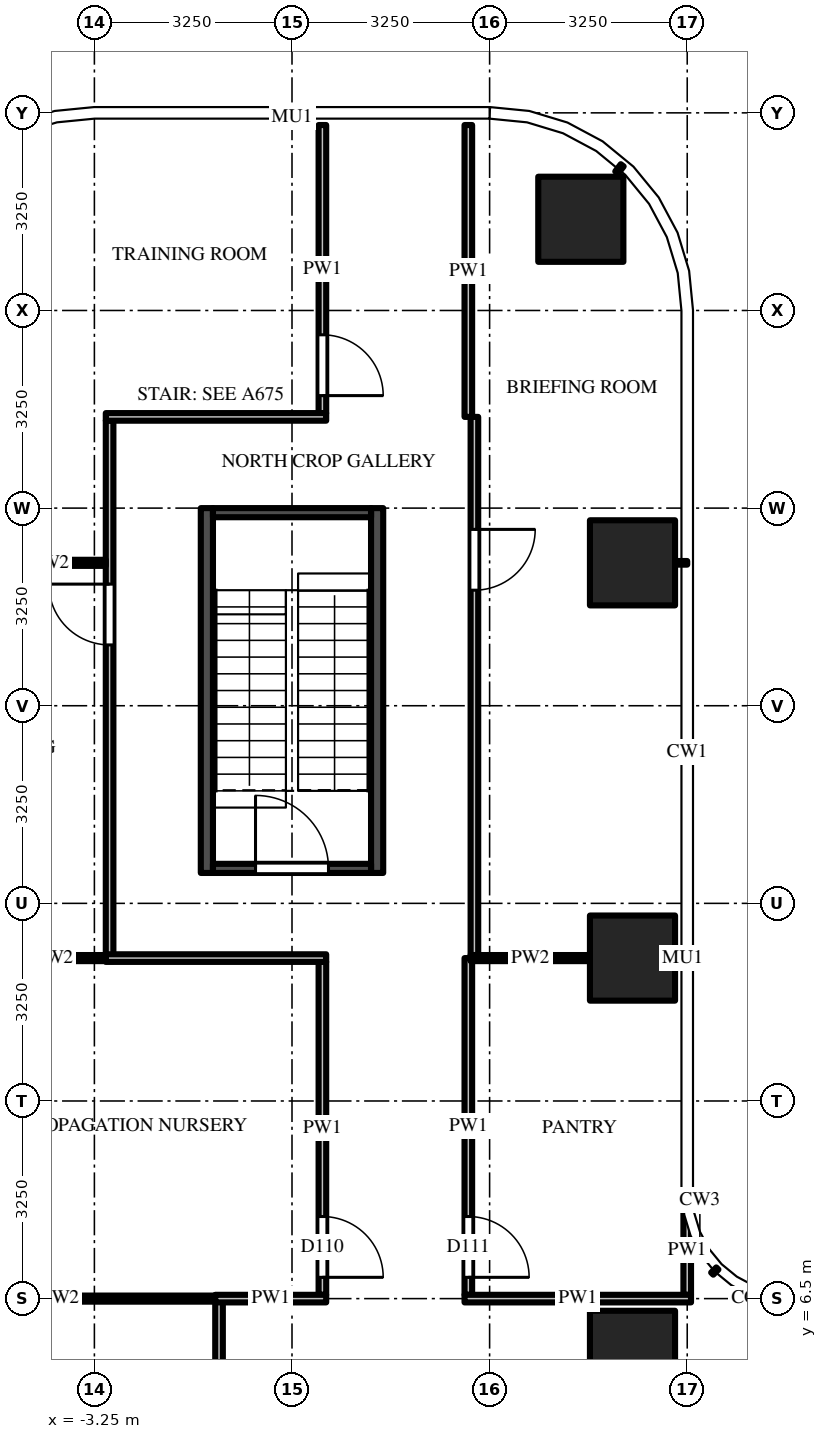
"""IFC4 building model, lengths in metres.
Left out: names, types, materials, properties, quantities, classifications, styles, units other than length and angle.
Written with IfcOpenShell. Run it as: python <this file> out.ifc"""

import sys

from ifc_helpers import new_model, si_unit, direction, frame, frame_2d, origin, origin_2d, place, context, subcontext, project, spatial, rectangle, extrude, source, transform, mapped, element, fill, save


model = new_model("IFC4")
c1 = context("Model", 3, precision=1e-05, world=origin(), true_north=direction((0.0, 1.0)))
c2 = subcontext(c1, "Body", "Model", "MODEL_VIEW")
j1 = project(units=[si_unit("LENGTHUNIT", "METRE"), si_unit("PLANEANGLEUNIT", "RADIAN")], contexts=[c1])
p1 = place(None, origin())
s1 = spatial("IfcSite", under=j1, at=p1, CompositionType="ELEMENT")
p2 = place(p1, origin())
s2 = spatial("IfcBuilding", under=s1, at=p2, CompositionType="ELEMENT")
p3 = place(p2, frame((0.0, 0.0, 88.0)))
s3 = spatial("IfcBuildingStorey", under=s2, at=p3, CompositionType="ELEMENT", Elevation=88.0)
m1 = source(origin(), c2, "Body", "SweptSolid", [
    extrude(rectangle(XDim=1.4, YDim=1.4, at=origin_2d()), origin(), (0.0, 0.0, 1.0), 4.5),
])
for number, where, z_axis, x_axis in (
    (1, (5.6, 12.1, 0.0), (0.0, 0.0, 1.0), (1.0, 0.0, 0.0)),
    (2, (5.6, 18.6, 0.0), (0.0, 0.0, 1.0), (1.0, 0.0, 0.0)),
    (3, (4.75, 24.25, 0.0), (0.0, 0.0, 1.0), (1.0, 0.0, 0.0)),
    (4, (5.6, 5.6, 0.0), (0.0, 0.0, 1.0), (1.0, 0.0, 0.0)),
):
    element("IfcColumn", number, at=place(p3, frame(where, z_axis=z_axis, x_axis=x_axis)), inside=s3, PredefinedType="COLUMN", context=c2, shape_type="MappedRepresentation", body=[
        mapped(m1, transform((0.0, 0.0, 0.0))),
    ])
m2 = source(origin(), c2, "Body", "SweptSolid", [
    extrude(rectangle(XDim=6.0, YDim=0.2, at=frame_2d((3.0, 0.0))), origin(), (0.0, 0.0, 1.0), 4.2),
])
for number, where, z_axis, x_axis in (
    (5, (-1.4, 13.5, 0.0), (0.0, 0.0, 1.0), (0.0, 1.0, 0.0)),
    (6, (1.4, 13.5, 0.0), (0.0, 0.0, 1.0), (0.0, 1.0, 0.0)),
):
    element("IfcWall", number, at=place(p3, frame(where, z_axis=z_axis, x_axis=x_axis)), inside=s3, PredefinedType="SHEAR", context=c2, shape_type="MappedRepresentation", body=[
        mapped(m2, transform((0.0, 0.0, 0.0))),
    ])
m3 = source(origin(), c2, "Body", "SweptSolid", [
    extrude(rectangle(XDim=2.6, YDim=0.15, at=frame_2d((1.3, 0.0))), origin(), (0.0, 0.0, 1.0), 4.2),
])
p4 = place(p3, frame((-1.3, 13.575, 0.0), z_axis=(0.0, 0.0, 1.0), x_axis=(1.0, 0.0, 0.0)))
e7 = element("IfcWall", 7, at=p4, inside=s3, PredefinedType="SHEAR", context=c2, shape_type="MappedRepresentation", body=[
    mapped(m3, transform((0.0, 0.0, 0.0))),
])
m4 = source(origin(), c2, "Body", "SweptSolid", [
    extrude(rectangle(XDim=1.2, YDim=2.1, at=frame_2d((0.6, 1.05))), frame((0.0, 0.085, 0.0), z_axis=(0.0, -1.0, 0.0), x_axis=(1.0, 0.0, 0.0)), (0.0, 0.0, 1.0), 0.17),
])
p5 = place(p4, frame((0.7, 0.0, 0.0)))
e8 = element("IfcOpeningElement", 8, at=p5, cuts=e7, PredefinedType="OPENING", context=c2, shape_type="MappedRepresentation", body=[
    mapped(m4, transform((0.0, 0.0, 0.0))),
])
p6 = place(p3, frame((-1.3, 19.425, 0.0), z_axis=(0.0, 0.0, 1.0), x_axis=(1.0, 0.0, 0.0)))
e9 = element("IfcWall", 9, at=p6, inside=s3, PredefinedType="SHEAR", context=c2, shape_type="MappedRepresentation", body=[
    mapped(m3, transform((0.0, 0.0, 0.0))),
])
p7 = place(p3, frame((-3.0, 12.15, 0.0), z_axis=(0.0, 0.0, 1.0), x_axis=(0.0, 1.0, 0.0)))
e10 = element("IfcWall", 10, at=p7, inside=s3, PredefinedType="PARTITIONING", context=c2, shape_type="SweptSolid", body=[
    extrude(rectangle(XDim=8.788, YDim=0.125, at=frame_2d((4.394, 0.0))), origin(), (0.0, 0.0, 1.0), 3.418),
])
m5 = source(origin(), c2, "Body", "SweptSolid", [
    extrude(rectangle(XDim=1.0, YDim=2.1, at=frame_2d((0.5, 1.05))), frame((0.0, 0.073, 0.0), z_axis=(0.0, -1.0, 0.0), x_axis=(1.0, 0.0, 0.0)), (0.0, 0.0, 1.0), 0.145),
])
p8 = place(p7, frame((5.1, 0.0, 0.0)))
e11 = element("IfcOpeningElement", 11, at=p8, cuts=e10, PredefinedType="OPENING", context=c2, shape_type="MappedRepresentation", body=[
    mapped(m5, transform((0.0, 0.0, 0.0))),
])
m6 = source(origin(), c2, "Body", "SweptSolid", [
    extrude(rectangle(XDim=3.137, YDim=0.125, at=frame_2d((1.569, 0.0))), origin(), (0.0, 0.0, 1.0), 3.418),
])
p9 = place(p3, frame((-1.2, 6.45, 0.0), z_axis=(0.0, 0.0, 1.0), x_axis=(0.0, -1.0, 0.0)))
e12 = element("IfcWall", 12, at=p9, inside=s3, PredefinedType="PARTITIONING", context=c2, shape_type="MappedRepresentation", body=[
    mapped(m6, transform((0.0, 0.0, 0.0))),
])
m7 = source(origin(), c2, "Body", "SweptSolid", [
    extrude(rectangle(XDim=5.475, YDim=0.125, at=frame_2d((2.738, 0.0))), origin(), (0.0, 0.0, 1.0), 3.418),
])
p10 = place(p3, frame((0.5, 12.038, 0.0), z_axis=(0.0, 0.0, 1.0), x_axis=(0.0, -1.0, 0.0)))
e13 = element("IfcWall", 13, at=p10, inside=s3, PredefinedType="PARTITIONING", context=c2, shape_type="MappedRepresentation", body=[
    mapped(m7, transform((0.0, 0.0, 0.0))),
])
p11 = place(p10, frame((4.188, 0.0, 0.0)))
e14 = element("IfcOpeningElement", 14, at=p11, cuts=e13, PredefinedType="OPENING", context=c2, shape_type="MappedRepresentation", body=[
    mapped(m5, transform((0.0, 0.0, 0.0))),
])
p12 = place(p3, frame((0.5, 25.8, 0.0), z_axis=(0.0, 0.0, 1.0), x_axis=(0.0, -1.0, 0.0)))
e15 = element("IfcWall", 15, at=p12, inside=s3, PredefinedType="PARTITIONING", context=c2, shape_type="SweptSolid", body=[
    extrude(rectangle(XDim=4.738, YDim=0.125, at=frame_2d((2.369, 0.0))), origin(), (0.0, 0.0, 1.0), 3.28),
])
p13 = place(p12, frame((3.45, 0.0, 0.0)))
e16 = element("IfcOpeningElement", 16, at=p13, cuts=e15, PredefinedType="OPENING", context=c2, shape_type="MappedRepresentation", body=[
    mapped(m5, transform((0.0, 0.0, 0.0))),
])
m8 = source(origin(), c2, "Body", "SweptSolid", [
    extrude(rectangle(XDim=5.538, YDim=0.125, at=frame_2d((2.769, 0.0))), origin(), (0.0, 0.0, 1.0), 3.418),
])
p14 = place(p3, frame((2.9, 12.1, 0.0), z_axis=(0.0, 0.0, 1.0), x_axis=(0.0, -1.0, 0.0)))
e17 = element("IfcWall", 17, at=p14, inside=s3, PredefinedType="PARTITIONING", context=c2, shape_type="MappedRepresentation", body=[
    mapped(m8, transform((0.0, 0.0, 0.0))),
])
p15 = place(p14, frame((4.25, 0.0, 0.0)))
e18 = element("IfcOpeningElement", 18, at=p15, cuts=e17, PredefinedType="OPENING", context=c2, shape_type="MappedRepresentation", body=[
    mapped(m5, transform((0.0, 0.0, 0.0))),
])
p16 = place(p3, frame((2.9, 25.8, 0.0), z_axis=(0.0, 0.0, 1.0), x_axis=(0.0, -1.0, 0.0)))
e19 = element("IfcWall", 19, at=p16, inside=s3, PredefinedType="PARTITIONING", context=c2, shape_type="SweptSolid", body=[
    extrude(rectangle(XDim=4.8, YDim=0.125, at=frame_2d((2.4, 0.0))), origin(), (0.0, 0.0, 1.0), 3.28),
])
p17 = place(p3, frame((3.0, 21.0, 0.0), z_axis=(0.0, 0.0, 1.0), x_axis=(0.0, -1.0, 0.0)))
e20 = element("IfcWall", 20, at=p17, inside=s3, PredefinedType="PARTITIONING", context=c2, shape_type="SweptSolid", body=[
    extrude(rectangle(XDim=8.85, YDim=0.125, at=frame_2d((4.425, 0.0))), origin(), (0.0, 0.0, 1.0), 3.418),
])
p18 = place(p17, frame((1.85, 0.0, 0.0)))
e21 = element("IfcOpeningElement", 21, at=p18, cuts=e20, PredefinedType="OPENING", context=c2, shape_type="MappedRepresentation", body=[
    mapped(m5, transform((0.0, 0.0, 0.0))),
])
m9 = source(origin(), c2, "Body", "SweptSolid", [
    extrude(rectangle(XDim=1.469, YDim=0.125, at=frame_2d((0.734, 0.0))), origin(), (0.0, 0.0, 1.0), 4.2),
])
p19 = place(p3, frame((6.5, 6.562, 0.0), z_axis=(0.0, 0.0, 1.0), x_axis=(0.0, 1.0, 0.0)))
e22 = element("IfcWall", 22, at=p19, inside=s3, PredefinedType="PARTITIONING", context=c2, shape_type="MappedRepresentation", body=[
    mapped(m9, transform((0.0, 0.0, 0.0))),
])
m10 = source(origin(), c2, "Body", "SweptSolid", [
    extrude(rectangle(XDim=5.363, YDim=0.1, at=frame_2d((2.681, 0.0))), origin(), (0.0, 0.0, 1.0), 3.28),
])
p20 = place(p3, frame((-6.5, 6.5, 0.0), z_axis=(0.0, 0.0, 1.0), x_axis=(1.0, 0.0, 0.0)))
e23 = element("IfcWall", 23, at=p20, inside=s3, PredefinedType="PARTITIONING", context=c2, shape_type="MappedRepresentation", body=[
    mapped(m10, transform((0.0, 0.0, 0.0))),
])
m11 = source(origin(), c2, "Body", "SweptSolid", [
    extrude(rectangle(XDim=1.825, YDim=0.125, at=frame_2d((0.913, 0.0))), origin(), (0.0, 0.0, 1.0), 4.2),
])
p21 = place(p3, frame((-1.262, 6.5, 0.0), z_axis=(0.0, 0.0, 1.0), x_axis=(1.0, 0.0, 0.0)))
e24 = element("IfcWall", 24, at=p21, inside=s3, PredefinedType="PARTITIONING", context=c2, shape_type="MappedRepresentation", body=[
    mapped(m11, transform((0.0, 0.0, 0.0))),
])
m12 = source(origin(), c2, "Body", "SweptSolid", [
    extrude(rectangle(XDim=3.725, YDim=0.125, at=frame_2d((1.863, 0.0))), origin(), (0.0, 0.0, 1.0), 3.28),
])
p22 = place(p3, frame((2.837, 6.5, 0.0), z_axis=(0.0, 0.0, 1.0), x_axis=(1.0, 0.0, 0.0)))
e25 = element("IfcWall", 25, at=p22, inside=s3, PredefinedType="PARTITIONING", context=c2, shape_type="MappedRepresentation", body=[
    mapped(m12, transform((0.0, 0.0, 0.0))),
])
m13 = source(origin(), c2, "Body", "SweptSolid", [
    extrude(rectangle(XDim=1.962, YDim=0.1, at=frame_2d((0.981, 0.0))), origin(), (0.0, 0.0, 1.0), 3.418),
])
for number, where, z_axis, x_axis in (
    (26, (-4.9, 12.1, 0.0), (0.0, 0.0, 1.0), (1.0, 0.0, 0.0)),
    (27, (2.938, 12.1, 0.0), (0.0, 0.0, 1.0), (1.0, 0.0, 0.0)),
):
    element("IfcWall", number, at=place(p3, frame(where, z_axis=z_axis, x_axis=x_axis)), inside=s3, PredefinedType="PARTITIONING", context=c2, shape_type="MappedRepresentation", body=[
        mapped(m13, transform((0.0, 0.0, 0.0))),
    ])
m14 = source(origin(), c2, "Body", "SweptSolid", [
    extrude(rectangle(XDim=3.625, YDim=0.125, at=frame_2d((1.812, 0.0))), origin(), (0.0, 0.0, 1.0), 3.418),
])
p23 = place(p3, frame((0.562, 12.1, 0.0), z_axis=(0.0, 0.0, 1.0), x_axis=(-1.0, 0.0, 0.0)))
e28 = element("IfcWall", 28, at=p23, inside=s3, PredefinedType="PARTITIONING", context=c2, shape_type="MappedRepresentation", body=[
    mapped(m14, transform((0.0, 0.0, 0.0))),
])
p24 = place(p3, frame((-4.9, 18.6, 0.0), z_axis=(0.0, 0.0, 1.0), x_axis=(1.0, 0.0, 0.0)))
e29 = element("IfcWall", 29, at=p24, inside=s3, PredefinedType="PARTITIONING", context=c2, shape_type="SweptSolid", body=[
    extrude(rectangle(XDim=1.837, YDim=0.1, at=frame_2d((0.919, 0.0))), origin(), (0.0, 0.0, 1.0), 3.647),
])
p25 = place(p3, frame((-3.062, 21.0, 0.0), z_axis=(0.0, 0.0, 1.0), x_axis=(1.0, 0.0, 0.0)))
e30 = element("IfcWall", 30, at=p25, inside=s3, PredefinedType="PARTITIONING", context=c2, shape_type="SweptSolid", body=[
    extrude(rectangle(XDim=3.625, YDim=0.125, at=frame_2d((1.812, 0.0))), origin(), (0.0, 0.0, 1.0), 4.2),
])
m15 = source(origin(), c2, "Body", "SweptSolid", [
    extrude(rectangle(XDim=1.2, YDim=2.1, at=frame_2d((0.6, 1.05))), frame((0.0, 0.025, 0.0), z_axis=(0.0, -1.0, 0.0), x_axis=(1.0, 0.0, 0.0)), (0.0, 0.0, 1.0), 0.05),
])
p26 = place(p5, origin())
e31 = element("IfcDoor", 31, at=p26, inside=s3, OperationType="SINGLE_SWING_LEFT", PredefinedType="DOOR", context=c2, shape_type="MappedRepresentation", body=[
    mapped(m15, transform((0.0, 0.0, 0.0))),
])
fill(e8, e31)
m16 = source(origin(), c2, "Body", "SweptSolid", [
    extrude(rectangle(XDim=1.0, YDim=2.1, at=frame_2d((0.5, 1.05))), frame((0.0, 0.025, 0.0), z_axis=(0.0, -1.0, 0.0), x_axis=(1.0, 0.0, 0.0)), (0.0, 0.0, 1.0), 0.05),
])
p27 = place(p11, origin())
e32 = element("IfcDoor", 32, at=p27, inside=s3, OperationType="SINGLE_SWING_RIGHT", PredefinedType="DOOR", context=c2, shape_type="MappedRepresentation", body=[
    mapped(m16, transform((0.0, 0.0, 0.0))),
])
fill(e14, e32)
p28 = place(p15, origin())
e33 = element("IfcDoor", 33, at=p28, inside=s3, OperationType="SINGLE_SWING_RIGHT", PredefinedType="DOOR", context=c2, shape_type="MappedRepresentation", body=[
    mapped(m16, transform((0.0, 0.0, 0.0))),
])
fill(e18, e33)
p29 = place(p8, origin())
e34 = element("IfcDoor", 34, at=p29, inside=s3, OperationType="SINGLE_SWING_RIGHT", PredefinedType="DOOR", context=c2, shape_type="MappedRepresentation", body=[
    mapped(m16, transform((0.0, 0.0, 0.0))),
])
fill(e11, e34)
p30 = place(p18, origin())
e35 = element("IfcDoor", 35, at=p30, inside=s3, OperationType="SINGLE_SWING_LEFT", PredefinedType="DOOR", context=c2, shape_type="MappedRepresentation", body=[
    mapped(m16, transform((0.0, 0.0, 0.0))),
])
fill(e21, e35)
p31 = place(p13, origin())
e36 = element("IfcDoor", 36, at=p31, inside=s3, OperationType="SINGLE_SWING_RIGHT", PredefinedType="DOOR", context=c2, shape_type="MappedRepresentation", body=[
    mapped(m16, transform((0.0, 0.0, 0.0))),
])
fill(e16, e36)
save(model, sys.argv[1])
